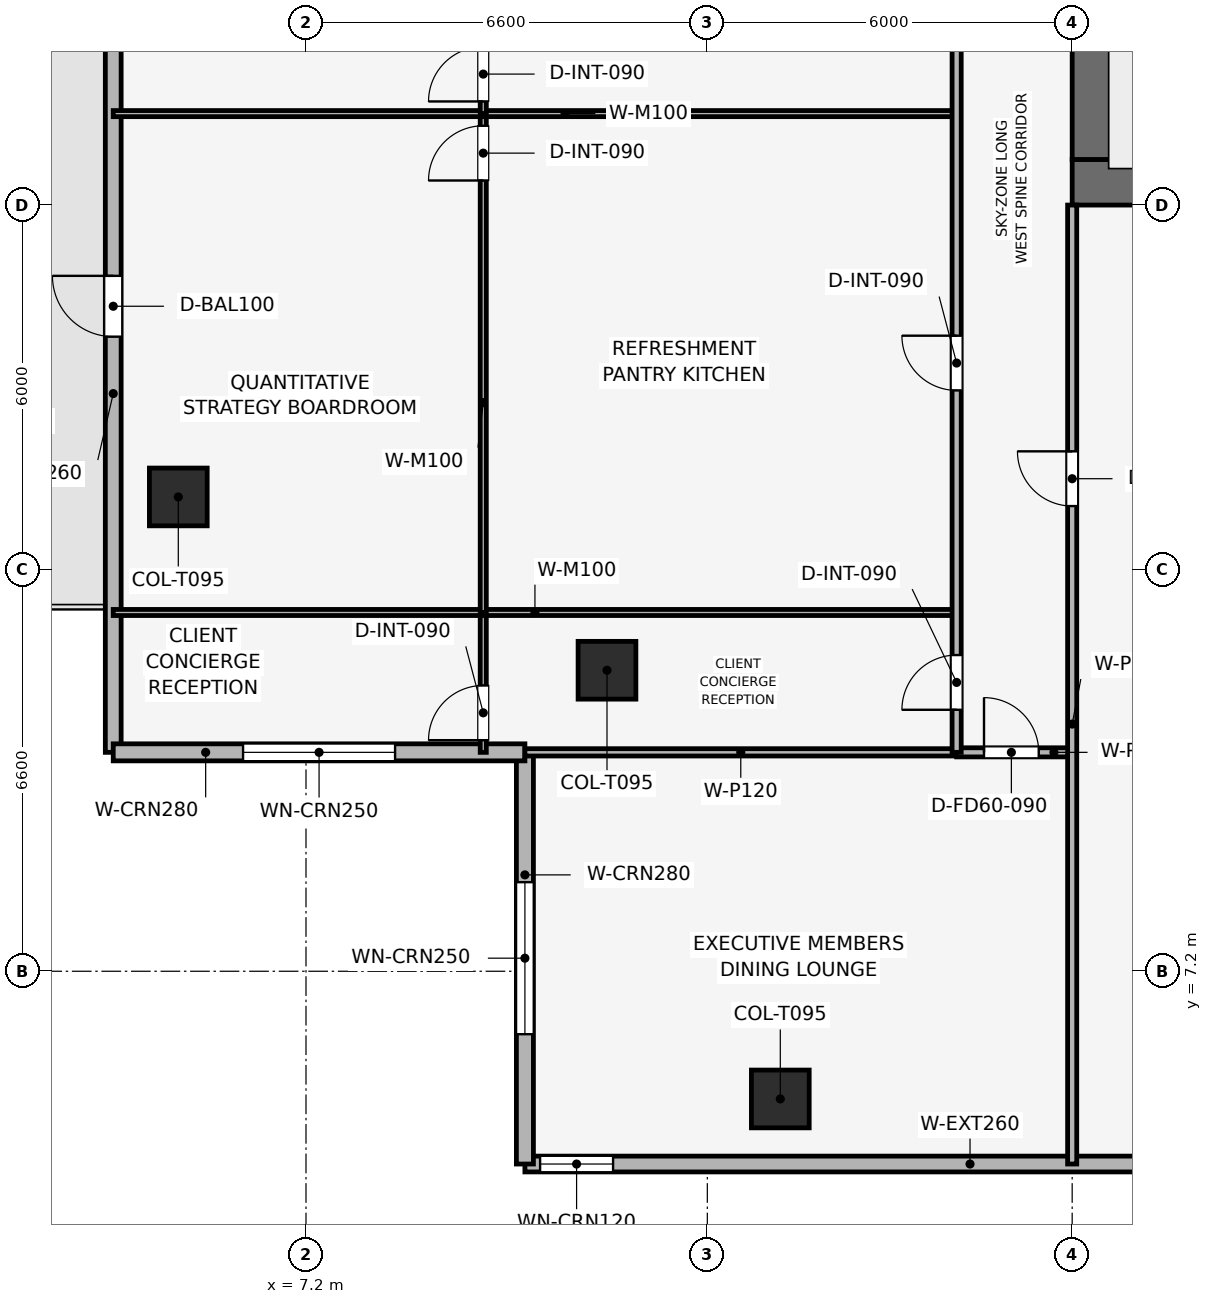
"""IFC4 building model, lengths in metres.
Left out: names, types, materials, properties, quantities, classifications, styles, units other than length and angle.
Written with IfcOpenShell. Run it as: python <this file> out.ifc"""

import sys

from ifc_helpers import new_model, si_unit, direction, frame, frame_2d, origin, origin_2d, place, context, subcontext, project, spatial, rectangle, extrude, element, fill, save


model = new_model("IFC4")
c1 = context("Model", 3, precision=1e-05, world=origin(), true_north=direction((0.0, 1.0)))
c2 = subcontext(c1, "Body", "Model", "MODEL_VIEW")
j1 = project(units=[si_unit("LENGTHUNIT", "METRE"), si_unit("PLANEANGLEUNIT", "RADIAN")], contexts=[c1])
p1 = place(None, origin())
s1 = spatial("IfcSite", under=j1, at=p1, CompositionType="ELEMENT")
p2 = place(p1, origin())
s2 = spatial("IfcBuilding", under=s1, at=p2, CompositionType="ELEMENT")
p3 = place(p2, frame((0.0, 0.0, 272.85)))
s3 = spatial("IfcBuildingStorey", under=s2, at=p3, CompositionType="ELEMENT", Elevation=272.85)
p4 = place(p3, frame((19.8, 20.175, 0.0), z_axis=(0.0, 0.0, 1.0), x_axis=(1.0, 0.0, 0.0)))
e1 = element("IfcWall", 1, at=p4, inside=s3, PredefinedType="SHEAR", context=c2, shape_type="SweptSolid", body=[
    extrude(rectangle(XDim=18.0, YDim=0.75, at=frame_2d((9.0, 0.0))), origin(), (0.0, 0.0, 1.0), 3.75),
])
p5 = place(p3, frame((20.175, 20.55, 0.0), z_axis=(0.0, 0.0, 1.0), x_axis=(0.0, 1.0, 0.0)))
e2 = element("IfcWall", 2, at=p5, inside=s3, PredefinedType="SHEAR", context=c2, shape_type="SweptSolid", body=[
    extrude(rectangle(XDim=16.5, YDim=0.75, at=frame_2d((8.25, 0.0))), origin(), (0.0, 0.0, 1.0), 3.75),
])
p6 = place(p5, frame((10.25, 0.0, 0.0)))
e3 = element("IfcOpeningElement", 3, at=p6, cuts=e2, PredefinedType="OPENING", context=c2, shape_type="SweptSolid", body=[
    extrude(rectangle(XDim=1.1, YDim=2.15, at=frame_2d((0.55, 1.075))), frame((0.0, 0.385, 0.0), z_axis=(0.0, -1.0, 0.0), x_axis=(1.0, 0.0, 0.0)), (0.0, 0.0, 1.0), 0.77),
])
for number, where, z_axis, x_axis in (
    (4, (15.0, 5.1, 0.003), (0.0, 0.0, 1.0), (1.0, 0.0, 0.0)),
    (5, (5.1, 15.0, 0.003), (0.0, 0.0, 1.0), (1.0, 0.0, 0.0)),
    (6, (12.15, 12.15, 0.003), (0.0, 0.0, 1.0), (1.0, 0.0, 0.0)),
):
    element("IfcColumn", number, at=place(p3, frame(where, z_axis=z_axis, x_axis=x_axis)), inside=s3, PredefinedType="COLUMN", context=c2, shape_type="SweptSolid", body=[
        extrude(rectangle(XDim=0.95, YDim=0.95, at=origin_2d()), origin(), (0.0, 0.0, 1.0), 3.494),
    ])
p7 = place(p3, frame((24.0, 4.03, 0.0), z_axis=(0.0, 0.0, 1.0), x_axis=(-1.0, 0.0, 0.0)))
e7 = element("IfcWall", 7, at=p7, inside=s3, PredefinedType="SOLIDWALL", context=c2, shape_type="SweptSolid", body=[
    extrude(rectangle(XDim=13.2, YDim=0.26, at=frame_2d((6.6, 0.0))), origin(), (0.0, 0.0, 1.0), 3.5),
])
p8 = place(p7, frame((11.75, 0.0, 0.9)))
e8 = element("IfcOpeningElement", 8, at=p8, cuts=e7, PredefinedType="OPENING", context=c2, shape_type="SweptSolid", body=[
    extrude(rectangle(XDim=1.2, YDim=2.1, at=frame_2d((0.6, 1.05))), frame((0.0, 0.14, 0.0), z_axis=(0.0, -1.0, 0.0), x_axis=(1.0, 0.0, 0.0)), (0.0, 0.0, 1.0), 0.28),
])
p9 = place(p3, frame((4.03, 10.8, 0.0), z_axis=(0.0, 0.0, 1.0), x_axis=(0.0, 1.0, 0.0)))
e9 = element("IfcWall", 9, at=p9, inside=s3, PredefinedType="SOLIDWALL", context=c2, shape_type="SweptSolid", body=[
    extrude(rectangle(XDim=13.2, YDim=0.26, at=frame_2d((6.6, 0.0))), origin(), (0.0, 0.0, 1.0), 3.5),
])
p10 = place(p9, frame((6.836, 0.0, 0.0)))
e10 = element("IfcOpeningElement", 10, at=p10, cuts=e9, PredefinedType="OPENING", context=c2, shape_type="SweptSolid", body=[
    extrude(rectangle(XDim=1.0, YDim=2.2, at=frame_2d((0.5, 1.1))), frame((0.0, 0.14, 0.0), z_axis=(0.0, -1.0, 0.0), x_axis=(1.0, 0.0, 0.0)), (0.0, 0.0, 1.0), 0.28),
])
p11 = place(p3, frame((10.8, 4.03, 0.0), z_axis=(0.0, 0.0, 1.0), x_axis=(0.0, 1.0, 0.0)))
e11 = element("IfcWall", 11, at=p11, inside=s3, PredefinedType="SOLIDWALL", context=c2, shape_type="SweptSolid", body=[
    extrude(rectangle(XDim=6.77, YDim=0.28, at=frame_2d((3.385, 0.0))), origin(), (0.0, 0.0, 1.0), 3.5),
])
p12 = place(p11, frame((2.135, 0.0, 0.9)))
e12 = element("IfcOpeningElement", 12, at=p12, cuts=e11, PredefinedType="OPENING", context=c2, shape_type="SweptSolid", body=[
    extrude(rectangle(XDim=2.5, YDim=1.9, at=frame_2d((1.25, 0.95))), frame((0.0, 0.15, 0.0), z_axis=(0.0, -1.0, 0.0), x_axis=(1.0, 0.0, 0.0)), (0.0, 0.0, 1.0), 0.3),
])
p13 = place(p3, frame((10.8, 10.8, 0.0), z_axis=(0.0, 0.0, 1.0), x_axis=(-1.0, 0.0, 0.0)))
e13 = element("IfcWall", 13, at=p13, inside=s3, PredefinedType="SOLIDWALL", context=c2, shape_type="SweptSolid", body=[
    extrude(rectangle(XDim=6.77, YDim=0.28, at=frame_2d((3.385, 0.0))), origin(), (0.0, 0.0, 1.0), 3.5),
])
p14 = place(p13, frame((2.135, 0.0, 0.9)))
e14 = element("IfcOpeningElement", 14, at=p14, cuts=e13, PredefinedType="OPENING", context=c2, shape_type="SweptSolid", body=[
    extrude(rectangle(XDim=2.5, YDim=1.9, at=frame_2d((1.25, 0.95))), frame((0.0, 0.15, 0.0), z_axis=(0.0, -1.0, 0.0), x_axis=(1.0, 0.0, 0.0)), (0.0, 0.0, 1.0), 0.3),
])
p15 = place(p3, frame((10.115, 10.8, 0.0), z_axis=(0.0, 0.0, 1.0), x_axis=(0.0, 1.0, 0.0)))
e15 = element("IfcWall", 15, at=p15, inside=s3, PredefinedType="MOVABLE", context=c2, shape_type="SweptSolid", body=[
    extrude(rectangle(XDim=2.3, YDim=0.1, at=frame_2d((1.15, 0.0))), origin(), (0.0, 0.0, 1.0), 3.085),
])
p16 = place(p15, frame((0.2, 0.0, 0.0)))
e16 = element("IfcOpeningElement", 16, at=p16, cuts=e15, PredefinedType="OPENING", context=c2, shape_type="SweptSolid", body=[
    extrude(rectangle(XDim=0.9, YDim=2.1, at=frame_2d((0.45, 1.05))), frame((0.0, 0.06, 0.0), z_axis=(0.0, -1.0, 0.0), x_axis=(1.0, 0.0, 0.0)), (0.0, 0.0, 1.0), 0.12),
])
p17 = place(p3, frame((4.03, 13.1, 0.0), z_axis=(0.0, 0.0, 1.0), x_axis=(1.0, 0.0, 0.0)))
e17 = element("IfcWall", 17, at=p17, inside=s3, PredefinedType="MOVABLE", context=c2, shape_type="SweptSolid", body=[
    extrude(rectangle(XDim=13.87, YDim=0.1, at=frame_2d((6.935, 0.0))), origin(), (0.0, 0.0, 1.0), 3.085),
])
p18 = place(p3, frame((10.115, 13.1, 0.0), z_axis=(0.0, 0.0, 1.0), x_axis=(0.0, 1.0, 0.0)))
e18 = element("IfcWall", 18, at=p18, inside=s3, PredefinedType="MOVABLE", context=c2, shape_type="SweptSolid", body=[
    extrude(rectangle(XDim=8.204, YDim=0.1, at=frame_2d((4.102, 0.0))), origin(), (0.0, 0.0, 1.0), 3.085),
])
p19 = place(p18, frame((7.104, 0.0, 0.0)))
e19 = element("IfcOpeningElement", 19, at=p19, cuts=e18, PredefinedType="OPENING", context=c2, shape_type="SweptSolid", body=[
    extrude(rectangle(XDim=0.9, YDim=2.1, at=frame_2d((0.45, 1.05))), frame((0.0, 0.06, 0.0), z_axis=(0.0, -1.0, 0.0), x_axis=(1.0, 0.0, 0.0)), (0.0, 0.0, 1.0), 0.12),
])
p20 = place(p3, frame((4.03, 21.304, 0.0), z_axis=(0.0, 0.0, 1.0), x_axis=(1.0, 0.0, 0.0)))
e20 = element("IfcWall", 20, at=p20, inside=s3, PredefinedType="MOVABLE", context=c2, shape_type="SweptSolid", body=[
    extrude(rectangle(XDim=13.87, YDim=0.1, at=frame_2d((6.935, 0.0))), origin(), (0.0, 0.0, 1.0), 3.085),
])
p21 = place(p3, frame((10.115, 21.304, 0.0), z_axis=(0.0, 0.0, 1.0), x_axis=(0.0, 1.0, 0.0)))
e21 = element("IfcWall", 21, at=p21, inside=s3, PredefinedType="MOVABLE", context=c2, shape_type="SweptSolid", body=[
    extrude(rectangle(XDim=7.931, YDim=0.1, at=frame_2d((3.966, 0.0))), origin(), (0.0, 0.0, 1.0), 3.085),
])
p22 = place(p21, frame((0.2, 0.0, 0.0)))
e22 = element("IfcOpeningElement", 22, at=p22, cuts=e21, PredefinedType="OPENING", context=c2, shape_type="SweptSolid", body=[
    extrude(rectangle(XDim=0.9, YDim=2.1, at=frame_2d((0.45, 1.05))), frame((0.0, 0.06, 0.0), z_axis=(0.0, -1.0, 0.0), x_axis=(1.0, 0.0, 0.0)), (0.0, 0.0, 1.0), 0.12),
])
p23 = place(p3, frame((10.8, 10.8, 0.0), z_axis=(0.0, 0.0, 1.0), x_axis=(1.0, 0.0, 0.0)))
e23 = element("IfcWall", 23, at=p23, inside=s3, PredefinedType="PARTITIONING", context=c2, shape_type="SweptSolid", body=[
    extrude(rectangle(XDim=7.1, YDim=0.12, at=frame_2d((3.55, 0.0))), origin(), (0.0, 0.0, 1.0), 3.085),
])
p24 = place(p3, frame((17.9, 10.8, 0.0), z_axis=(0.0, 0.0, 1.0), x_axis=(1.0, 0.0, 0.0)))
e24 = element("IfcWall", 24, at=p24, inside=s3, PredefinedType="PARTITIONING", context=c2, shape_type="SweptSolid", body=[
    extrude(rectangle(XDim=1.9, YDim=0.15, at=frame_2d((0.95, 0.0))), origin(), (0.0, 0.0, 1.0), 3.5),
])
p25 = place(p24, frame((0.45, 0.0, 0.0)))
e25 = element("IfcOpeningElement", 25, at=p25, cuts=e24, PredefinedType="OPENING", context=c2, shape_type="SweptSolid", body=[
    extrude(rectangle(XDim=0.9, YDim=2.1, at=frame_2d((0.45, 1.05))), frame((0.0, 0.085, 0.0), z_axis=(0.0, -1.0, 0.0), x_axis=(1.0, 0.0, 0.0)), (0.0, 0.0, 1.0), 0.17),
])
p26 = place(p3, frame((19.8, 4.03, 0.0), z_axis=(0.0, 0.0, 1.0), x_axis=(0.0, 1.0, 0.0)))
e26 = element("IfcWall", 26, at=p26, inside=s3, PredefinedType="PARTITIONING", context=c2, shape_type="SweptSolid", body=[
    extrude(rectangle(XDim=15.77, YDim=0.15, at=frame_2d((7.885, 0.0))), origin(), (0.0, 0.0, 1.0), 3.085),
])
p27 = place(p26, frame((10.82, 0.0, 0.0)))
e27 = element("IfcOpeningElement", 27, at=p27, cuts=e26, PredefinedType="OPENING", context=c2, shape_type="SweptSolid", body=[
    extrude(rectangle(XDim=0.9, YDim=2.1, at=frame_2d((0.45, 1.05))), frame((0.0, 0.085, 0.0), z_axis=(0.0, -1.0, 0.0), x_axis=(1.0, 0.0, 0.0)), (0.0, 0.0, 1.0), 0.17),
])
p28 = place(p3, frame((17.9, 10.8, 0.0), z_axis=(0.0, 0.0, 1.0), x_axis=(0.0, 1.0, 0.0)))
e28 = element("IfcWall", 28, at=p28, inside=s3, PredefinedType="PARTITIONING", context=c2, shape_type="SweptSolid", body=[
    extrude(rectangle(XDim=28.9, YDim=0.15, at=frame_2d((14.45, 0.0))), origin(), (0.0, 0.0, 1.0), 3.085),
])
p29 = place(p28, frame((0.7, 0.0, 0.0)))
e29 = element("IfcOpeningElement", 29, at=p29, cuts=e28, PredefinedType="OPENING", context=c2, shape_type="SweptSolid", body=[
    extrude(rectangle(XDim=0.9, YDim=2.1, at=frame_2d((0.45, 1.05))), frame((0.0, 0.085, 0.0), z_axis=(0.0, -1.0, 0.0), x_axis=(1.0, 0.0, 0.0)), (0.0, 0.0, 1.0), 0.17),
])
p30 = place(p28, frame((5.952, 0.0, 0.0)))
e30 = element("IfcOpeningElement", 30, at=p30, cuts=e28, PredefinedType="OPENING", context=c2, shape_type="SweptSolid", body=[
    extrude(rectangle(XDim=0.9, YDim=2.1, at=frame_2d((0.45, 1.05))), frame((0.0, 0.085, 0.0), z_axis=(0.0, -1.0, 0.0), x_axis=(1.0, 0.0, 0.0)), (0.0, 0.0, 1.0), 0.17),
])
p31 = place(p28, frame((14.02, 0.0, 0.0)))
e31 = element("IfcOpeningElement", 31, at=p31, cuts=e28, PredefinedType="OPENING", context=c2, shape_type="SweptSolid", body=[
    extrude(rectangle(XDim=0.9, YDim=2.1, at=frame_2d((0.45, 1.05))), frame((0.0, 0.085, 0.0), z_axis=(0.0, -1.0, 0.0), x_axis=(1.0, 0.0, 0.0)), (0.0, 0.0, 1.0), 0.17),
])
p32 = place(p28, frame((23.217, 0.0, 0.0)))
e32 = element("IfcOpeningElement", 32, at=p32, cuts=e28, PredefinedType="OPENING", context=c2, shape_type="SweptSolid", body=[
    extrude(rectangle(XDim=0.9, YDim=2.1, at=frame_2d((0.45, 1.05))), frame((0.0, 0.085, 0.0), z_axis=(0.0, -1.0, 0.0), x_axis=(1.0, 0.0, 0.0)), (0.0, 0.0, 1.0), 0.17),
])
p33 = place(p8, origin())
e33 = element("IfcWindow", 33, at=p33, inside=s3, PartitioningType="SINGLE_PANEL", PredefinedType="WINDOW", context=c2, shape_type="SweptSolid", body=[
    extrude(rectangle(XDim=1.2, YDim=2.1, at=frame_2d((0.6, 1.05))), frame((0.0, 0.03, 0.0), z_axis=(0.0, -1.0, 0.0), x_axis=(1.0, 0.0, 0.0)), (0.0, 0.0, 1.0), 0.06),
])
fill(e8, e33)
p34 = place(p10, origin())
e34 = element("IfcDoor", 34, at=p34, inside=s3, OperationType="SINGLE_SWING_RIGHT", PredefinedType="DOOR", context=c2, shape_type="SweptSolid", body=[
    extrude(rectangle(XDim=1.0, YDim=2.2, at=frame_2d((0.5, 1.1))), frame((0.0, 0.025, 0.0), z_axis=(0.0, -1.0, 0.0), x_axis=(1.0, 0.0, 0.0)), (0.0, 0.0, 1.0), 0.05),
])
fill(e10, e34)
p35 = place(p12, origin())
e35 = element("IfcWindow", 35, at=p35, inside=s3, PartitioningType="SINGLE_PANEL", PredefinedType="WINDOW", context=c2, shape_type="SweptSolid", body=[
    extrude(rectangle(XDim=2.5, YDim=1.9, at=frame_2d((1.25, 0.95))), frame((0.0, 0.03, 0.0), z_axis=(0.0, -1.0, 0.0), x_axis=(1.0, 0.0, 0.0)), (0.0, 0.0, 1.0), 0.06),
])
fill(e12, e35)
p36 = place(p14, origin())
e36 = element("IfcWindow", 36, at=p36, inside=s3, PartitioningType="SINGLE_PANEL", PredefinedType="WINDOW", context=c2, shape_type="SweptSolid", body=[
    extrude(rectangle(XDim=2.5, YDim=1.9, at=frame_2d((1.25, 0.95))), frame((0.0, 0.03, 0.0), z_axis=(0.0, -1.0, 0.0), x_axis=(1.0, 0.0, 0.0)), (0.0, 0.0, 1.0), 0.06),
])
fill(e14, e36)
p37 = place(p16, origin())
e37 = element("IfcDoor", 37, at=p37, inside=s3, OperationType="SINGLE_SWING_LEFT", PredefinedType="DOOR", context=c2, shape_type="SweptSolid", body=[
    extrude(rectangle(XDim=0.9, YDim=2.1, at=frame_2d((0.45, 1.05))), frame((0.0, 0.025, 0.0), z_axis=(0.0, -1.0, 0.0), x_axis=(1.0, 0.0, 0.0)), (0.0, 0.0, 1.0), 0.05),
])
fill(e16, e37)
p38 = place(p19, origin())
e38 = element("IfcDoor", 38, at=p38, inside=s3, OperationType="SINGLE_SWING_LEFT", PredefinedType="DOOR", context=c2, shape_type="SweptSolid", body=[
    extrude(rectangle(XDim=0.9, YDim=2.1, at=frame_2d((0.45, 1.05))), frame((0.0, 0.025, 0.0), z_axis=(0.0, -1.0, 0.0), x_axis=(1.0, 0.0, 0.0)), (0.0, 0.0, 1.0), 0.05),
])
fill(e19, e38)
p39 = place(p22, origin())
e39 = element("IfcDoor", 39, at=p39, inside=s3, OperationType="SINGLE_SWING_LEFT", PredefinedType="DOOR", context=c2, shape_type="SweptSolid", body=[
    extrude(rectangle(XDim=0.9, YDim=2.1, at=frame_2d((0.45, 1.05))), frame((0.0, 0.025, 0.0), z_axis=(0.0, -1.0, 0.0), x_axis=(1.0, 0.0, 0.0)), (0.0, 0.0, 1.0), 0.05),
])
fill(e22, e39)
p40 = place(p25, origin())
e40 = element("IfcDoor", 40, at=p40, inside=s3, OperationType="SINGLE_SWING_LEFT", PredefinedType="DOOR", context=c2, shape_type="SweptSolid", body=[
    extrude(rectangle(XDim=0.9, YDim=2.1, at=frame_2d((0.45, 1.05))), frame((0.0, 0.025, 0.0), z_axis=(0.0, -1.0, 0.0), x_axis=(1.0, 0.0, 0.0)), (0.0, 0.0, 1.0), 0.05),
])
fill(e25, e40)
p41 = place(p27, origin())
e41 = element("IfcDoor", 41, at=p41, inside=s3, OperationType="SINGLE_SWING_RIGHT", PredefinedType="DOOR", context=c2, shape_type="SweptSolid", body=[
    extrude(rectangle(XDim=0.9, YDim=2.1, at=frame_2d((0.45, 1.05))), frame((0.0, 0.025, 0.0), z_axis=(0.0, -1.0, 0.0), x_axis=(1.0, 0.0, 0.0)), (0.0, 0.0, 1.0), 0.05),
])
fill(e27, e41)
p42 = place(p29, origin())
e42 = element("IfcDoor", 42, at=p42, inside=s3, OperationType="SINGLE_SWING_LEFT", PredefinedType="DOOR", context=c2, shape_type="SweptSolid", body=[
    extrude(rectangle(XDim=0.9, YDim=2.1, at=frame_2d((0.45, 1.05))), frame((0.0, 0.025, 0.0), z_axis=(0.0, -1.0, 0.0), x_axis=(1.0, 0.0, 0.0)), (0.0, 0.0, 1.0), 0.05),
])
fill(e29, e42)
p43 = place(p30, origin())
e43 = element("IfcDoor", 43, at=p43, inside=s3, OperationType="SINGLE_SWING_RIGHT", PredefinedType="DOOR", context=c2, shape_type="SweptSolid", body=[
    extrude(rectangle(XDim=0.9, YDim=2.1, at=frame_2d((0.45, 1.05))), frame((0.0, 0.025, 0.0), z_axis=(0.0, -1.0, 0.0), x_axis=(1.0, 0.0, 0.0)), (0.0, 0.0, 1.0), 0.05),
])
fill(e30, e43)
save(model, sys.argv[1])
